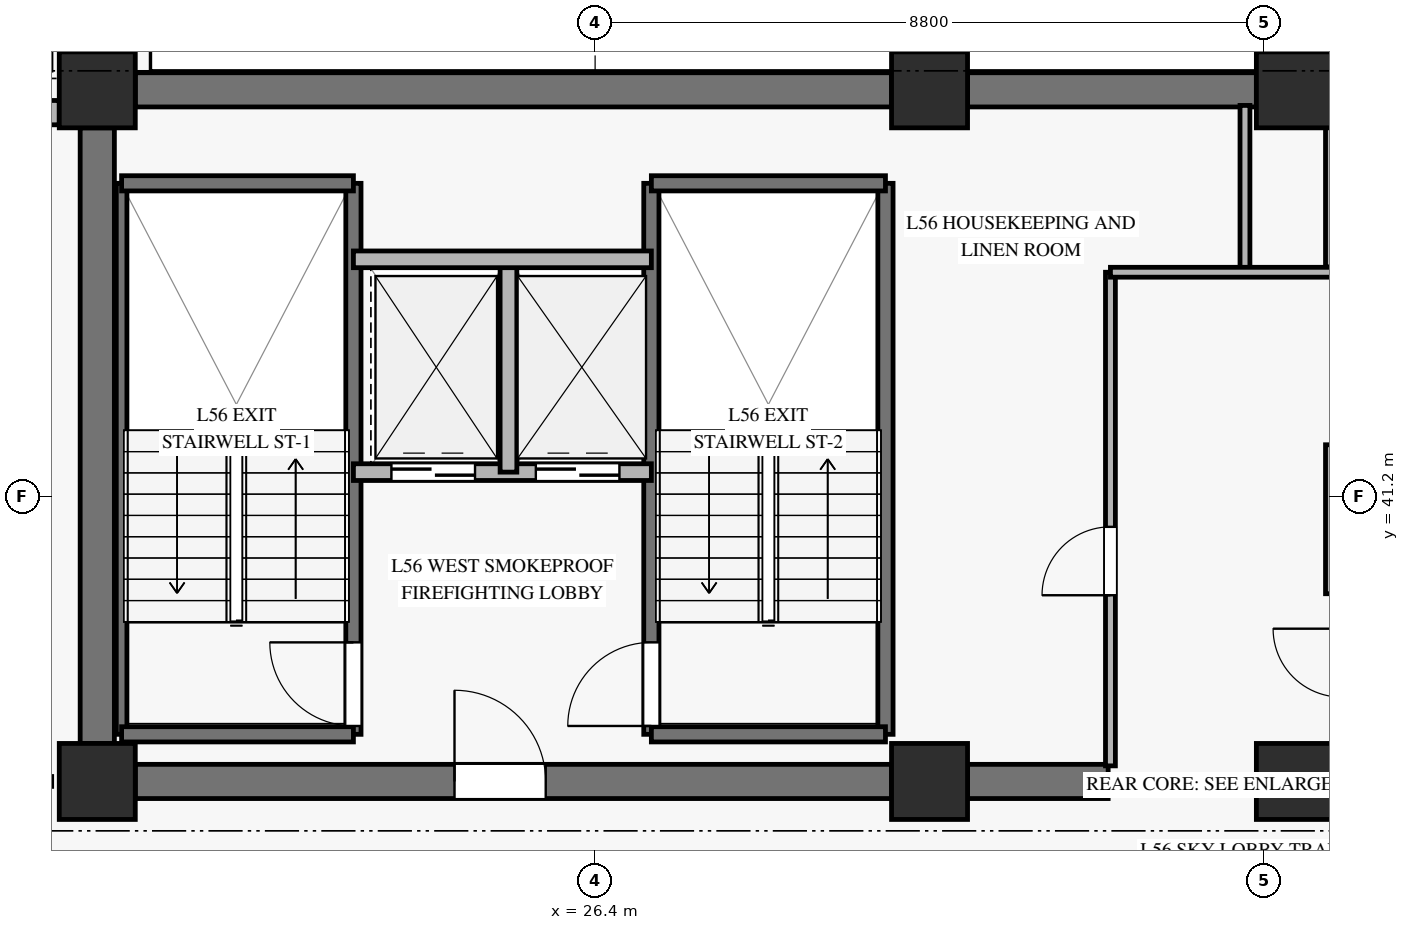
"""IFC4 building model, lengths in metres.
Left out: names, types, materials, properties, quantities, classifications, styles, units other than length and angle.
Written with IfcOpenShell. Run it as: python <this file> out.ifc"""

import sys

from ifc_helpers import new_model, si_unit, direction, frame, frame_2d, origin, origin_2d, place, context, subcontext, project, spatial, rectangle, extrude, source, transform, mapped, element, fill, save


model = new_model("IFC4")
c1 = context("Model", 3, precision=1e-05, world=origin(), true_north=direction((0.0, 1.0)))
c2 = subcontext(c1, "Body", "Model", "MODEL_VIEW")
j1 = project(units=[si_unit("LENGTHUNIT", "METRE"), si_unit("PLANEANGLEUNIT", "RADIAN")], contexts=[c1])
p1 = place(None, origin())
s1 = spatial("IfcSite", under=j1, at=p1, CompositionType="ELEMENT")
p2 = place(p1, origin())
s2 = spatial("IfcBuilding", under=s1, at=p2, CompositionType="ELEMENT")
p3 = place(p2, frame((0.0, 0.0, 220.2)))
s3 = spatial("IfcBuildingStorey", under=s2, at=p3, CompositionType="ELEMENT", Elevation=220.2)
m1 = source(origin(), c2, "Body", "SweptSolid", [
    extrude(rectangle(XDim=1.0, YDim=1.0, at=origin_2d()), origin(), (0.0, 0.0, 1.0), 6.585),
])
for number, where, z_axis, x_axis in (
    (1, (19.85, 37.45, 0.0), (0.0, 0.0, 1.0), (1.0, 0.0, 0.0)),
    (2, (19.85, 46.55, 0.0), (0.0, 0.0, 1.0), (1.0, 0.0, 0.0)),
    (3, (30.8, 37.45, 0.0), (0.0, 0.0, 1.0), (1.0, 0.0, 0.0)),
    (4, (30.8, 46.55, 0.0), (0.0, 0.0, 1.0), (1.0, 0.0, 0.0)),
    (5, (35.6, 37.45, 0.0), (0.0, 0.0, 1.0), (1.0, 0.0, 0.0)),
    (6, (35.6, 46.55, 0.0), (0.0, 0.0, 1.0), (1.0, 0.0, 0.0)),
):
    element("IfcColumn", number, at=place(p3, frame(where, z_axis=z_axis, x_axis=x_axis)), inside=s3, PredefinedType="PILASTER", context=c2, shape_type="MappedRepresentation", body=[
        mapped(m1, transform((0.0, 0.0, 0.0), x_axis=(1.0, 0.0, 0.0), y_axis=(0.0, 1.0, 0.0), z_axis=(0.0, 0.0, 1.0), scale=1.0)),
    ])
p4 = place(p3, frame((20.35, 46.55, 0.0), z_axis=(0.0, 0.0, 1.0), x_axis=(1.0, 0.0, 0.0)))
e7 = element("IfcWall", 7, at=p4, inside=s3, PredefinedType="SHEAR", context=c2, shape_type="SweptSolid", body=[
    extrude(rectangle(XDim=9.95, YDim=0.45, at=frame_2d((4.975, 0.0))), origin(), (0.0, 0.0, 1.0), 6.585),
])
p5 = place(p3, frame((31.3, 46.55, 0.0), z_axis=(0.0, 0.0, 1.0), x_axis=(1.0, 0.0, 0.0)))
e8 = element("IfcWall", 8, at=p5, inside=s3, PredefinedType="SHEAR", context=c2, shape_type="SweptSolid", body=[
    extrude(rectangle(XDim=3.8, YDim=0.45, at=frame_2d((1.9, 0.0))), origin(), (0.0, 0.0, 1.0), 6.585),
])
p6 = place(p3, frame((20.35, 37.45, 0.0), z_axis=(0.0, 0.0, 1.0), x_axis=(1.0, 0.0, 0.0)))
e9 = element("IfcWall", 9, at=p6, inside=s3, PredefinedType="SHEAR", context=c2, shape_type="SweptSolid", body=[
    extrude(rectangle(XDim=9.95, YDim=0.45, at=frame_2d((4.975, 0.0))), origin(), (0.0, 0.0, 1.0), 6.585),
])
p7 = place(p6, frame((4.2, 0.0, 0.0)))
e10 = element("IfcOpeningElement", 10, at=p7, cuts=e9, PredefinedType="OPENING", context=c2, shape_type="SweptSolid", body=[
    extrude(rectangle(XDim=1.2, YDim=2.15, at=frame_2d((0.6, 1.075))), frame((0.0, 0.235, 0.0), z_axis=(0.0, -1.0, 0.0), x_axis=(1.0, 0.0, 0.0)), (0.0, 0.0, 1.0), 0.47),
])
p8 = place(p3, frame((31.3, 37.45, 0.0), z_axis=(0.0, 0.0, 1.0), x_axis=(1.0, 0.0, 0.0)))
e11 = element("IfcWall", 11, at=p8, inside=s3, PredefinedType="SHEAR", context=c2, shape_type="SweptSolid", body=[
    extrude(rectangle(XDim=1.85, YDim=0.45, at=frame_2d((0.925, 0.0))), origin(), (0.0, 0.0, 1.0), 6.585),
])
p9 = place(p3, frame((19.85, 37.95, 0.0), z_axis=(0.0, 0.0, 1.0), x_axis=(0.0, 1.0, 0.0)))
e12 = element("IfcWall", 12, at=p9, inside=s3, PredefinedType="SHEAR", context=c2, shape_type="SweptSolid", body=[
    extrude(rectangle(XDim=8.1, YDim=0.45, at=frame_2d((4.05, 0.0))), origin(), (0.0, 0.0, 1.0), 6.585),
])
p10 = place(p3, frame((10.172, 46.25, 0.0), z_axis=(0.0, 0.0, 1.0), x_axis=(1.0, 0.0, 0.0)))
e13 = element("IfcWall", 13, at=p10, inside=s3, PredefinedType="SOLIDWALL", context=c2, shape_type="SweptSolid", body=[
    extrude(rectangle(XDim=9.178, YDim=0.32, at=frame_2d((4.589, 0.0))), origin(), (0.0, 0.0, 1.0), 6.065),
])
p11 = place(p10, frame((3.789, 0.0, 0.45)))
e14 = element("IfcOpeningElement", 14, at=p11, cuts=e13, PredefinedType="OPENING", context=c2, shape_type="SweptSolid", body=[
    extrude(rectangle(XDim=1.6, YDim=2.0, at=frame_2d((0.8, 1.0))), frame((0.0, 0.17, 0.0), z_axis=(0.0, -1.0, 0.0), x_axis=(1.0, 0.0, 0.0)), (0.0, 0.0, 1.0), 0.34),
])
p12 = place(p3, frame((20.17, 38.07, 0.0), z_axis=(0.0, 0.0, 1.0), x_axis=(0.0, 1.0, 0.0)))
e15 = element("IfcWall", 15, at=p12, inside=s3, PredefinedType="SOLIDWALL", context=c2, shape_type="SweptSolid", body=[
    extrude(rectangle(XDim=7.25, YDim=0.14, at=frame_2d((3.625, 0.0))), origin(), (0.0, 0.0, 1.0), 6.8),
])
p13 = place(p3, frame((23.22, 38.07, 0.0), z_axis=(0.0, 0.0, 1.0), x_axis=(0.0, 1.0, 0.0)))
e16 = element("IfcWall", 16, at=p13, inside=s3, PredefinedType="SOLIDWALL", context=c2, shape_type="SweptSolid", body=[
    extrude(rectangle(XDim=7.25, YDim=0.2, at=frame_2d((3.625, 0.0))), origin(), (0.0, 0.0, 1.0), 6.8),
])
p14 = place(p13, frame((0.11, 0.0, 0.0)))
e17 = element("IfcOpeningElement", 17, at=p14, cuts=e16, PredefinedType="OPENING", context=c2, shape_type="SweptSolid", body=[
    extrude(rectangle(XDim=1.1, YDim=2.15, at=frame_2d((0.55, 1.075))), frame((0.0, 0.11, 0.0), z_axis=(0.0, -1.0, 0.0), x_axis=(1.0, 0.0, 0.0)), (0.0, 0.0, 1.0), 0.22),
])
for number, where, z_axis, x_axis in (
    (18, (20.17, 45.32, 0.0), (0.0, 0.0, 1.0), (1.0, 0.0, 0.0)),
    (19, (20.17, 38.07, 0.0), (0.0, 0.0, 1.0), (1.0, 0.0, 0.0)),
):
    element("IfcWall", number, at=place(p3, frame(where, z_axis=z_axis, x_axis=x_axis)), inside=s3, PredefinedType="SOLIDWALL", context=c2, shape_type="SweptSolid", body=[
        extrude(rectangle(XDim=3.05, YDim=0.2, at=frame_2d((1.525, 0.0))), origin(), (0.0, 0.0, 1.0), 6.8),
    ])
p15 = place(p3, frame((27.14, 38.07, 0.0), z_axis=(0.0, 0.0, 1.0), x_axis=(0.0, 1.0, 0.0)))
e20 = element("IfcWall", 20, at=p15, inside=s3, PredefinedType="SOLIDWALL", context=c2, shape_type="SweptSolid", body=[
    extrude(rectangle(XDim=7.25, YDim=0.2, at=frame_2d((3.625, 0.0))), origin(), (0.0, 0.0, 1.0), 6.8),
])
p16 = place(p15, frame((0.11, 0.0, 0.0)))
e21 = element("IfcOpeningElement", 21, at=p16, cuts=e20, PredefinedType="OPENING", context=c2, shape_type="SweptSolid", body=[
    extrude(rectangle(XDim=1.1, YDim=2.15, at=frame_2d((0.55, 1.075))), frame((0.0, 0.11, 0.0), z_axis=(0.0, -1.0, 0.0), x_axis=(1.0, 0.0, 0.0)), (0.0, 0.0, 1.0), 0.22),
])
p17 = place(p3, frame((30.22, 38.07, 0.0), z_axis=(0.0, 0.0, 1.0), x_axis=(0.0, 1.0, 0.0)))
e22 = element("IfcWall", 22, at=p17, inside=s3, PredefinedType="SOLIDWALL", context=c2, shape_type="SweptSolid", body=[
    extrude(rectangle(XDim=7.25, YDim=0.2, at=frame_2d((3.625, 0.0))), origin(), (0.0, 0.0, 1.0), 6.8),
])
for number, where, z_axis, x_axis in (
    (23, (27.14, 45.32, 0.0), (0.0, 0.0, 1.0), (1.0, 0.0, 0.0)),
    (24, (27.14, 38.07, 0.0), (0.0, 0.0, 1.0), (1.0, 0.0, 0.0)),
):
    element("IfcWall", number, at=place(p3, frame(where, z_axis=z_axis, x_axis=x_axis)), inside=s3, PredefinedType="SOLIDWALL", context=c2, shape_type="SweptSolid", body=[
        extrude(rectangle(XDim=3.08, YDim=0.2, at=frame_2d((1.54, 0.0))), origin(), (0.0, 0.0, 1.0), 6.8),
    ])
p18 = place(p3, frame((23.22, 41.52, 0.0), z_axis=(0.0, 0.0, 1.0), x_axis=(1.0, 0.0, 0.0)))
e25 = element("IfcWall", 25, at=p18, inside=s3, PredefinedType="SOLIDWALL", context=c2, shape_type="SweptSolid", body=[
    extrude(rectangle(XDim=3.92, YDim=0.22, at=frame_2d((1.96, 0.0))), origin(), (0.0, 0.0, 1.0), 6.585),
])
p19 = place(p18, frame((0.5, 0.0, 0.0)))
e26 = element("IfcOpeningElement", 26, at=p19, cuts=e25, PredefinedType="OPENING", context=c2, shape_type="SweptSolid", body=[
    extrude(rectangle(XDim=1.1, YDim=2.2, at=frame_2d((0.55, 1.1))), frame((0.0, 0.12, 0.0), z_axis=(0.0, -1.0, 0.0), x_axis=(1.0, 0.0, 0.0)), (0.0, 0.0, 1.0), 0.24),
])
p20 = place(p18, frame((2.4, 0.0, 0.0)))
e27 = element("IfcOpeningElement", 27, at=p20, cuts=e25, PredefinedType="OPENING", context=c2, shape_type="SweptSolid", body=[
    extrude(rectangle(XDim=1.1, YDim=2.2, at=frame_2d((0.55, 1.1))), frame((0.0, 0.12, 0.0), z_axis=(0.0, -1.0, 0.0), x_axis=(1.0, 0.0, 0.0)), (0.0, 0.0, 1.0), 0.24),
])
p21 = place(p3, frame((25.26, 41.52, 0.0), z_axis=(0.0, 0.0, 1.0), x_axis=(0.0, 1.0, 0.0)))
e28 = element("IfcWall", 28, at=p21, inside=s3, PredefinedType="SOLIDWALL", context=c2, shape_type="SweptSolid", body=[
    extrude(rectangle(XDim=2.8, YDim=0.22, at=frame_2d((1.4, 0.0))), origin(), (0.0, 0.0, 1.0), 6.585),
])
p22 = place(p3, frame((23.22, 44.32, 0.0), z_axis=(0.0, 0.0, 1.0), x_axis=(1.0, 0.0, 0.0)))
e29 = element("IfcWall", 29, at=p22, inside=s3, PredefinedType="SOLIDWALL", context=c2, shape_type="SweptSolid", body=[
    extrude(rectangle(XDim=3.92, YDim=0.22, at=frame_2d((1.96, 0.0))), origin(), (0.0, 0.0, 1.0), 6.585),
])
p23 = place(p3, frame((36.12, 39.92, 0.0), z_axis=(0.0, 0.0, 1.0), x_axis=(0.0, 1.0, 0.0)))
e30 = element("IfcWall", 30, at=p23, inside=s3, PredefinedType="SOLIDWALL", context=c2, shape_type="SweptSolid", body=[
    extrude(rectangle(XDim=1.96, YDim=0.22, at=frame_2d((0.98, 0.0))), origin(), (0.0, 0.0, 1.0), 6.585),
])
p24 = place(p3, frame((36.12, 44.22, 0.0), z_axis=(0.0, 0.0, 1.0), x_axis=(0.0, 1.0, 0.0)))
e31 = element("IfcWall", 31, at=p24, inside=s3, PredefinedType="SOLIDWALL", context=c2, shape_type="SweptSolid", body=[
    extrude(rectangle(XDim=2.125, YDim=0.22, at=frame_2d((1.062, 0.0))), origin(), (0.0, 0.0, 1.0), 6.585),
])
p25 = place(p3, frame((33.18, 37.655, 0.0), z_axis=(0.0, 0.0, 1.0), x_axis=(0.0, 1.0, 0.0)))
e32 = element("IfcWall", 32, at=p25, inside=s3, PredefinedType="PARTITIONING", context=c2, shape_type="SweptSolid", body=[
    extrude(rectangle(XDim=6.495, YDim=0.13, at=frame_2d((3.248, 0.0))), origin(), (0.0, 0.0, 1.0), 5.67),
])
p26 = place(p25, frame((2.245, 0.0, 0.0)))
e33 = element("IfcOpeningElement", 33, at=p26, cuts=e32, PredefinedType="OPENING", context=c2, shape_type="SweptSolid", body=[
    extrude(rectangle(XDim=0.9, YDim=2.1, at=frame_2d((0.45, 1.05))), frame((0.0, 0.075, 0.0), z_axis=(0.0, -1.0, 0.0), x_axis=(1.0, 0.0, 0.0)), (0.0, 0.0, 1.0), 0.15),
])
p27 = place(p3, frame((34.95, 44.15, 0.0), z_axis=(0.0, 0.0, 1.0), x_axis=(0.0, 1.0, 0.0)))
e34 = element("IfcWall", 34, at=p27, inside=s3, PredefinedType="PARTITIONING", context=c2, shape_type="SweptSolid", body=[
    extrude(rectangle(XDim=2.195, YDim=0.13, at=frame_2d((1.098, 0.0))), origin(), (0.0, 0.0, 1.0), 6.585),
])
p28 = place(p3, frame((33.18, 44.15, 0.0), z_axis=(0.0, 0.0, 1.0), x_axis=(1.0, 0.0, 0.0)))
e35 = element("IfcWall", 35, at=p28, inside=s3, PredefinedType="PARTITIONING", context=c2, shape_type="SweptSolid", body=[
    extrude(rectangle(XDim=2.97, YDim=0.13, at=frame_2d((1.485, 0.0))), origin(), (0.0, 0.0, 1.0), 5.87),
])
m2 = source(origin(), c2, "Body", "SweptSolid", [
    extrude(rectangle(XDim=1.1, YDim=2.15, at=frame_2d((0.55, 1.075))), frame((0.0, 0.025, 0.0), z_axis=(0.0, -1.0, 0.0), x_axis=(1.0, 0.0, 0.0)), (0.0, 0.0, 1.0), 0.05),
])
p29 = place(p14, origin())
e36 = element("IfcDoor", 36, at=p29, inside=s3, OperationType="SINGLE_SWING_RIGHT", PredefinedType="DOOR", context=c2, shape_type="MappedRepresentation", body=[
    mapped(m2, transform((0.0, 0.0, 0.0), x_axis=(1.0, 0.0, 0.0), y_axis=(0.0, 1.0, 0.0), z_axis=(0.0, 0.0, 1.0), scale=1.0)),
])
fill(e17, e36)
p30 = place(p16, origin())
e37 = element("IfcDoor", 37, at=p30, inside=s3, OperationType="SINGLE_SWING_LEFT", PredefinedType="DOOR", context=c2, shape_type="MappedRepresentation", body=[
    mapped(m2, transform((0.0, 0.0, 0.0), x_axis=(1.0, 0.0, 0.0), y_axis=(0.0, 1.0, 0.0), z_axis=(0.0, 0.0, 1.0), scale=1.0)),
])
fill(e21, e37)
m3 = source(origin(), c2, "Body", "SweptSolid", [
    extrude(rectangle(XDim=1.1, YDim=2.2, at=frame_2d((0.55, 1.1))), frame((0.0, 0.025, 0.0), z_axis=(0.0, -1.0, 0.0), x_axis=(1.0, 0.0, 0.0)), (0.0, 0.0, 1.0), 0.05),
])
p31 = place(p19, origin())
e38 = element("IfcDoor", 38, at=p31, inside=s3, OperationType="SLIDING_TO_LEFT", PredefinedType="DOOR", context=c2, shape_type="MappedRepresentation", body=[
    mapped(m3, transform((0.0, 0.0, 0.0), x_axis=(1.0, 0.0, 0.0), y_axis=(0.0, 1.0, 0.0), z_axis=(0.0, 0.0, 1.0), scale=1.0)),
])
fill(e26, e38)
p32 = place(p20, origin())
e39 = element("IfcDoor", 39, at=p32, inside=s3, OperationType="SLIDING_TO_LEFT", PredefinedType="DOOR", context=c2, shape_type="MappedRepresentation", body=[
    mapped(m3, transform((0.0, 0.0, 0.0), x_axis=(1.0, 0.0, 0.0), y_axis=(0.0, 1.0, 0.0), z_axis=(0.0, 0.0, 1.0), scale=1.0)),
])
fill(e27, e39)
m4 = source(origin(), c2, "Body", "SweptSolid", [
    extrude(rectangle(XDim=1.2, YDim=2.15, at=frame_2d((0.6, 1.075))), frame((0.0, 0.025, 0.0), z_axis=(0.0, -1.0, 0.0), x_axis=(1.0, 0.0, 0.0)), (0.0, 0.0, 1.0), 0.05),
])
p33 = place(p7, origin())
e40 = element("IfcDoor", 40, at=p33, inside=s3, OperationType="SINGLE_SWING_LEFT", PredefinedType="DOOR", context=c2, shape_type="MappedRepresentation", body=[
    mapped(m4, transform((0.0, 0.0, 0.0), x_axis=(1.0, 0.0, 0.0), y_axis=(0.0, 1.0, 0.0), z_axis=(0.0, 0.0, 1.0), scale=1.0)),
])
fill(e10, e40)
m5 = source(origin(), c2, "Body", "SweptSolid", [
    extrude(rectangle(XDim=0.9, YDim=2.1, at=frame_2d((0.45, 1.05))), frame((0.0, 0.025, 0.0), z_axis=(0.0, -1.0, 0.0), x_axis=(1.0, 0.0, 0.0)), (0.0, 0.0, 1.0), 0.05),
])
p34 = place(p26, origin())
e41 = element("IfcDoor", 41, at=p34, inside=s3, OperationType="SINGLE_SWING_LEFT", PredefinedType="DOOR", context=c2, shape_type="MappedRepresentation", body=[
    mapped(m5, transform((0.0, 0.0, 0.0), x_axis=(1.0, 0.0, 0.0), y_axis=(0.0, 1.0, 0.0), z_axis=(0.0, 0.0, 1.0), scale=1.0)),
])
fill(e33, e41)
save(model, sys.argv[1])
